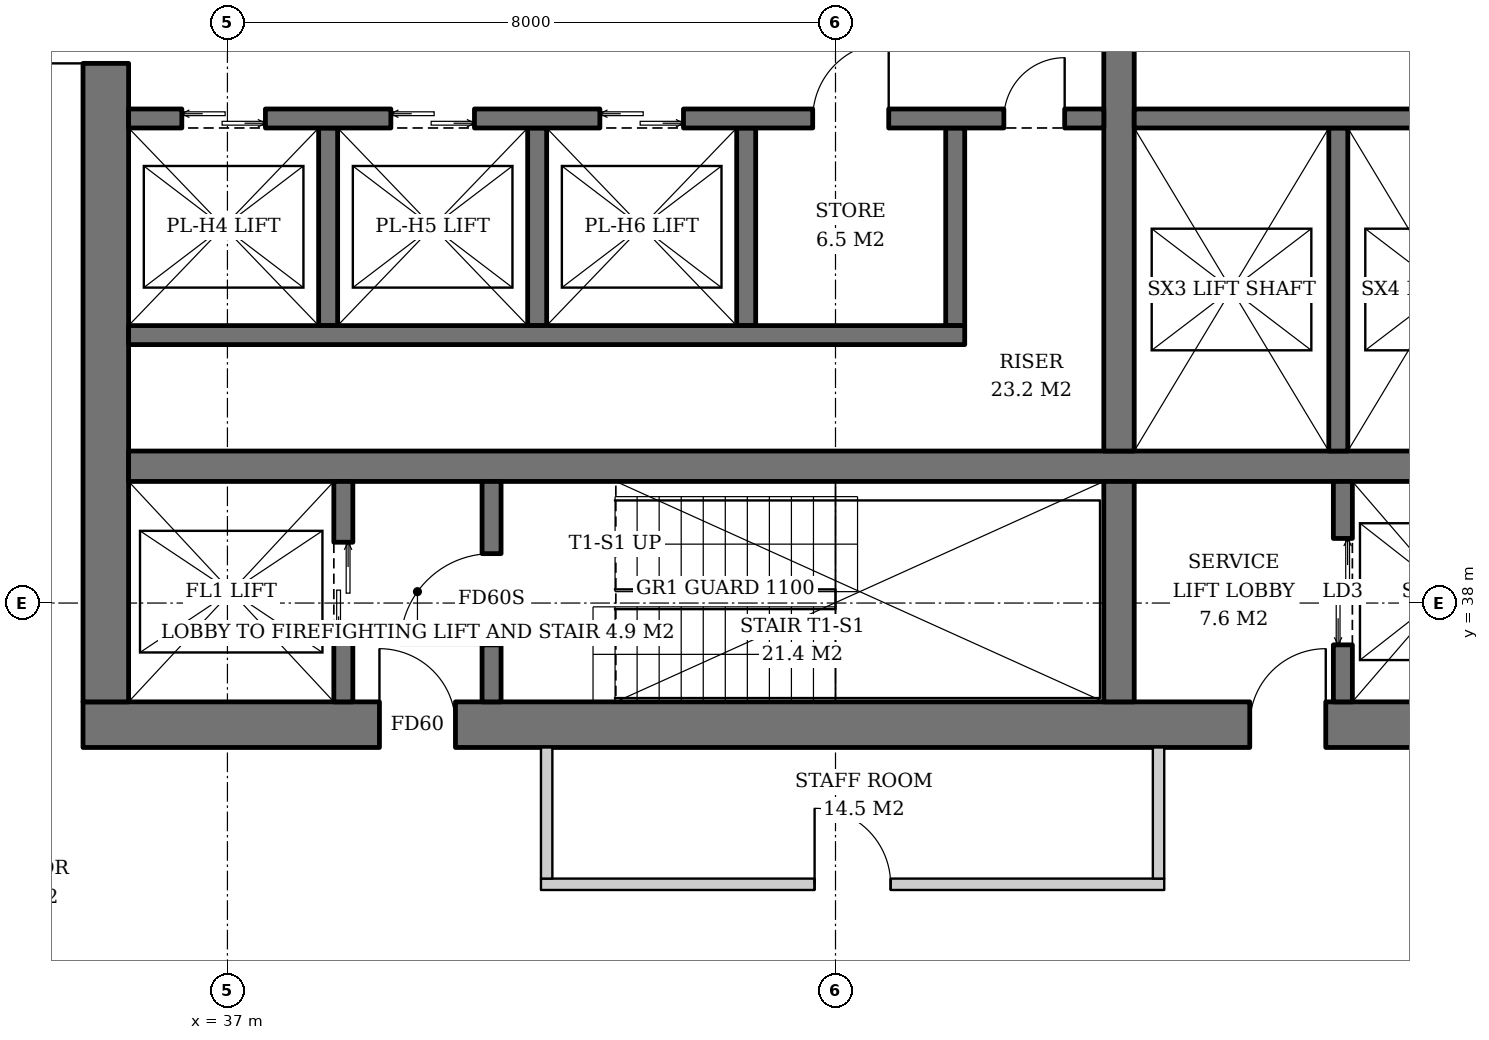
"""IFC4 building model, lengths in metres.
Left out: names, types, materials, properties, quantities, classifications, styles, units other than length and angle.
Written with IfcOpenShell. Run it as: python <this file> out.ifc"""

import sys

from ifc_helpers import new_model, si_unit, direction, frame, frame_2d, origin, place, context, subcontext, project, spatial, rectangle, extrude, element, fill, save


model = new_model("IFC4")
c1 = context("Model", 3, precision=1e-05, world=origin(), true_north=direction((0.0, 1.0)))
c2 = subcontext(c1, "Body", "Model", "MODEL_VIEW")
j1 = project(units=[si_unit("LENGTHUNIT", "METRE"), si_unit("PLANEANGLEUNIT", "RADIAN")], contexts=[c1])
p1 = place(None, origin())
s1 = spatial("IfcSite", under=j1, at=p1, CompositionType="ELEMENT")
p2 = place(p1, origin())
s2 = spatial("IfcBuilding", under=s1, at=p2, CompositionType="ELEMENT")
p3 = place(p2, frame((0.0, 0.0, 218.6)))
s3 = spatial("IfcBuildingStorey", under=s2, at=p3, CompositionType="ELEMENT", Elevation=218.6)
p4 = place(p3, frame((35.1, 36.4, 0.0), z_axis=(0.0, 0.0, 1.0), x_axis=(1.0, 0.0, 0.0)))
e1 = element("IfcWall", 1, at=p4, inside=s3, PredefinedType="SHEAR", context=c2, shape_type="SweptSolid", body=[
    extrude(rectangle(XDim=19.8, YDim=0.6, at=frame_2d((9.9, 0.0))), origin(), (0.0, 0.0, 1.0), 3.8),
])
p5 = place(p4, frame((3.9, 0.0, 0.0)))
e2 = element("IfcOpeningElement", 2, at=p5, cuts=e1, PredefinedType="OPENING", context=c2, shape_type="SweptSolid", body=[
    extrude(rectangle(XDim=1.0, YDim=2.1, at=frame_2d((0.5, 1.05))), frame((0.0, 0.31, 0.0), z_axis=(0.0, -1.0, 0.0), x_axis=(1.0, 0.0, 0.0)), (0.0, 0.0, 1.0), 0.62),
])
p6 = place(p4, frame((15.35, 0.0, 0.0)))
e3 = element("IfcOpeningElement", 3, at=p6, cuts=e1, PredefinedType="OPENING", context=c2, shape_type="SweptSolid", body=[
    extrude(rectangle(XDim=1.0, YDim=2.1, at=frame_2d((0.5, 1.05))), frame((0.0, 0.31, 0.0), z_axis=(0.0, -1.0, 0.0), x_axis=(1.0, 0.0, 0.0)), (0.0, 0.0, 1.0), 0.62),
])
p7 = place(p3, frame((35.4, 36.7, 0.0), z_axis=(0.0, 0.0, 1.0), x_axis=(0.0, 1.0, 0.0)))
e4 = element("IfcWall", 4, at=p7, inside=s3, PredefinedType="SHEAR", context=c2, shape_type="SweptSolid", body=[
    extrude(rectangle(XDim=18.6, YDim=0.6, at=frame_2d((9.3, 0.0))), origin(), (0.0, 0.0, 1.0), 3.8),
])
p8 = place(p7, frame((8.4, 0.0, 0.0)))
e5 = element("IfcOpeningElement", 5, at=p8, cuts=e4, PredefinedType="OPENING", context=c2, shape_type="SweptSolid", body=[
    extrude(rectangle(XDim=1.8, YDim=2.4, at=frame_2d((0.9, 1.2))), frame((0.0, 0.31, 0.0), z_axis=(0.0, -1.0, 0.0), x_axis=(1.0, 0.0, 0.0)), (0.0, 0.0, 1.0), 0.62),
])
p9 = place(p3, frame((35.7, 39.8, 0.0), z_axis=(0.0, 0.0, 1.0), x_axis=(1.0, 0.0, 0.0)))
e6 = element("IfcWall", 6, at=p9, inside=s3, PredefinedType="SHEAR", context=c2, shape_type="SweptSolid", body=[
    extrude(rectangle(XDim=18.6, YDim=0.4, at=frame_2d((9.3, 0.0))), origin(), (0.0, 0.0, 1.0), 3.8),
])
p10 = place(p3, frame((48.73, 36.7, 0.0), z_axis=(0.0, 0.0, 1.0), x_axis=(0.0, 1.0, 0.0)))
e7 = element("IfcWall", 7, at=p10, inside=s3, PredefinedType="SHEAR", context=c2, shape_type="SweptSolid", body=[
    extrude(rectangle(XDim=2.9, YDim=0.4, at=frame_2d((1.45, 0.0))), origin(), (0.0, 0.0, 1.0), 3.8),
])
p11 = place(p3, frame((48.73, 40.0, 0.0), z_axis=(0.0, 0.0, 1.0), x_axis=(0.0, 1.0, 0.0)))
e8 = element("IfcWall", 8, at=p11, inside=s3, PredefinedType="SHEAR", context=c2, shape_type="SweptSolid", body=[
    extrude(rectangle(XDim=12.0, YDim=0.4, at=frame_2d((6.0, 0.0))), origin(), (0.0, 0.0, 1.0), 3.8),
])
p12 = place(p3, frame((38.525, 36.7, 0.0), z_axis=(0.0, 0.0, 1.0), x_axis=(0.0, 1.0, 0.0)))
e9 = element("IfcWall", 9, at=p12, inside=s3, PredefinedType="SHEAR", context=c2, shape_type="SweptSolid", body=[
    extrude(rectangle(XDim=2.9, YDim=0.25, at=frame_2d((1.45, 0.0))), origin(), (0.0, 0.0, 1.0), 3.8),
])
p13 = place(p12, frame((0.8, 0.0, 0.0)))
e10 = element("IfcOpeningElement", 10, at=p13, cuts=e9, PredefinedType="OPENING", context=c2, shape_type="SweptSolid", body=[
    extrude(rectangle(XDim=1.3, YDim=2.2, at=frame_2d((0.65, 1.1))), frame((0.0, 0.135, 0.0), z_axis=(0.0, -1.0, 0.0), x_axis=(1.0, 0.0, 0.0)), (0.0, 0.0, 1.0), 0.27),
])
p14 = place(p3, frame((40.475, 36.7, 0.0), z_axis=(0.0, 0.0, 1.0), x_axis=(0.0, 1.0, 0.0)))
e11 = element("IfcWall", 11, at=p14, inside=s3, PredefinedType="SHEAR", context=c2, shape_type="SweptSolid", body=[
    extrude(rectangle(XDim=2.9, YDim=0.25, at=frame_2d((1.45, 0.0))), origin(), (0.0, 0.0, 1.0), 3.8),
])
p15 = place(p14, frame((0.75, 0.0, 0.0)))
e12 = element("IfcOpeningElement", 12, at=p15, cuts=e11, PredefinedType="OPENING", context=c2, shape_type="SweptSolid", body=[
    extrude(rectangle(XDim=1.2, YDim=2.1, at=frame_2d((0.6, 1.05))), frame((0.0, 0.135, 0.0), z_axis=(0.0, -1.0, 0.0), x_axis=(1.0, 0.0, 0.0)), (0.0, 0.0, 1.0), 0.27),
])
p16 = place(p3, frame((51.675, 36.7, 0.0), z_axis=(0.0, 0.0, 1.0), x_axis=(0.0, 1.0, 0.0)))
e13 = element("IfcWall", 13, at=p16, inside=s3, PredefinedType="SHEAR", context=c2, shape_type="SweptSolid", body=[
    extrude(rectangle(XDim=2.9, YDim=0.25, at=frame_2d((1.45, 0.0))), origin(), (0.0, 0.0, 1.0), 3.8),
])
p17 = place(p16, frame((0.75, 0.0, 0.0)))
e14 = element("IfcOpeningElement", 14, at=p17, cuts=e13, PredefinedType="OPENING", context=c2, shape_type="SweptSolid", body=[
    extrude(rectangle(XDim=1.4, YDim=2.4, at=frame_2d((0.7, 1.2))), frame((0.0, 0.135, 0.0), z_axis=(0.0, -1.0, 0.0), x_axis=(1.0, 0.0, 0.0)), (0.0, 0.0, 1.0), 0.27),
])
for number, where, z_axis, x_axis in (
    (15, (38.325, 44.25, 0.0), (0.0, 0.0, 1.0), (0.0, -1.0, 0.0)),
    (16, (41.075, 44.25, 0.0), (0.0, 0.0, 1.0), (0.0, -1.0, 0.0)),
    (17, (43.825, 44.25, 0.0), (0.0, 0.0, 1.0), (0.0, -1.0, 0.0)),
    (18, (46.575, 44.25, 0.0), (0.0, 0.0, 1.0), (0.0, -1.0, 0.0)),
):
    element("IfcWall", number, at=place(p3, frame(where, z_axis=z_axis, x_axis=x_axis)), inside=s3, PredefinedType="SHEAR", context=c2, shape_type="SweptSolid", body=[
        extrude(rectangle(XDim=2.6, YDim=0.25, at=frame_2d((1.3, 0.0))), origin(), (0.0, 0.0, 1.0), 3.8),
    ])
p18 = place(p3, frame((35.7, 41.525, 0.0), z_axis=(0.0, 0.0, 1.0), x_axis=(1.0, 0.0, 0.0)))
e19 = element("IfcWall", 19, at=p18, inside=s3, PredefinedType="SHEAR", context=c2, shape_type="SweptSolid", body=[
    extrude(rectangle(XDim=11.0, YDim=0.25, at=frame_2d((5.5, 0.0))), origin(), (0.0, 0.0, 1.0), 3.8),
])
p19 = place(p3, frame((35.7, 44.375, 0.0), z_axis=(0.0, 0.0, 1.0), x_axis=(1.0, 0.0, 0.0)))
e20 = element("IfcWall", 20, at=p19, inside=s3, PredefinedType="SHEAR", context=c2, shape_type="SweptSolid", body=[
    extrude(rectangle(XDim=12.83, YDim=0.25, at=frame_2d((6.415, 0.0))), origin(), (0.0, 0.0, 1.0), 3.8),
])
p20 = place(p19, frame((0.7, 0.0, 0.0)))
e21 = element("IfcOpeningElement", 21, at=p20, cuts=e20, PredefinedType="OPENING", context=c2, shape_type="SweptSolid", body=[
    extrude(rectangle(XDim=1.1, YDim=2.2, at=frame_2d((0.55, 1.1))), frame((0.0, 0.135, 0.0), z_axis=(0.0, -1.0, 0.0), x_axis=(1.0, 0.0, 0.0)), (0.0, 0.0, 1.0), 0.27),
])
p21 = place(p19, frame((3.45, 0.0, 0.0)))
e22 = element("IfcOpeningElement", 22, at=p21, cuts=e20, PredefinedType="OPENING", context=c2, shape_type="SweptSolid", body=[
    extrude(rectangle(XDim=1.1, YDim=2.2, at=frame_2d((0.55, 1.1))), frame((0.0, 0.135, 0.0), z_axis=(0.0, -1.0, 0.0), x_axis=(1.0, 0.0, 0.0)), (0.0, 0.0, 1.0), 0.27),
])
p22 = place(p19, frame((6.2, 0.0, 0.0)))
e23 = element("IfcOpeningElement", 23, at=p22, cuts=e20, PredefinedType="OPENING", context=c2, shape_type="SweptSolid", body=[
    extrude(rectangle(XDim=1.1, YDim=2.2, at=frame_2d((0.55, 1.1))), frame((0.0, 0.135, 0.0), z_axis=(0.0, -1.0, 0.0), x_axis=(1.0, 0.0, 0.0)), (0.0, 0.0, 1.0), 0.27),
])
p23 = place(p19, frame((9.0, 0.0, 0.0)))
e24 = element("IfcOpeningElement", 24, at=p23, cuts=e20, PredefinedType="OPENING", context=c2, shape_type="SweptSolid", body=[
    extrude(rectangle(XDim=1.0, YDim=2.1, at=frame_2d((0.5, 1.05))), frame((0.0, 0.135, 0.0), z_axis=(0.0, -1.0, 0.0), x_axis=(1.0, 0.0, 0.0)), (0.0, 0.0, 1.0), 0.27),
])
p24 = place(p19, frame((11.515, 0.0, 0.0)))
e25 = element("IfcOpeningElement", 25, at=p24, cuts=e20, PredefinedType="OPENING", context=c2, shape_type="SweptSolid", body=[
    extrude(rectangle(XDim=0.8, YDim=2.0, at=frame_2d((0.4, 1.0))), frame((0.0, 0.135, 0.0), z_axis=(0.0, -1.0, 0.0), x_axis=(1.0, 0.0, 0.0)), (0.0, 0.0, 1.0), 0.27),
])
p25 = place(p3, frame((51.615, 44.25, 0.0), z_axis=(0.0, 0.0, 1.0), x_axis=(0.0, -1.0, 0.0)))
e26 = element("IfcWall", 26, at=p25, inside=s3, PredefinedType="SHEAR", context=c2, shape_type="SweptSolid", body=[
    extrude(rectangle(XDim=4.25, YDim=0.25, at=frame_2d((2.125, 0.0))), origin(), (0.0, 0.0, 1.0), 3.8),
])
p26 = place(p3, frame((48.93, 44.375, 0.0), z_axis=(0.0, 0.0, 1.0), x_axis=(1.0, 0.0, 0.0)))
e27 = element("IfcWall", 27, at=p26, inside=s3, PredefinedType="SHEAR", context=c2, shape_type="SweptSolid", body=[
    extrude(rectangle(XDim=5.37, YDim=0.25, at=frame_2d((2.685, 0.0))), origin(), (0.0, 0.0, 1.0), 3.8),
])
p27 = place(p3, frame((41.125, 34.3, 0.0), z_axis=(0.0, 0.0, 1.0), x_axis=(1.0, 0.0, 0.0)))
e28 = element("IfcWall", 28, at=p27, inside=s3, PredefinedType="PARTITIONING", context=c2, shape_type="SweptSolid", body=[
    extrude(rectangle(XDim=8.2, YDim=0.15, at=frame_2d((4.1, 0.0))), origin(), (0.0, 0.0, 1.0), 2.867),
])
p28 = place(p27, frame((3.6, 0.0, 0.0)))
e29 = element("IfcOpeningElement", 29, at=p28, cuts=e28, PredefinedType="OPENING", context=c2, shape_type="SweptSolid", body=[
    extrude(rectangle(XDim=1.0, YDim=2.1, at=frame_2d((0.5, 1.05))), frame((0.0, 0.085, 0.0), z_axis=(0.0, -1.0, 0.0), x_axis=(1.0, 0.0, 0.0)), (0.0, 0.0, 1.0), 0.17),
])
for number, where, z_axis, x_axis in (
    (30, (41.2, 36.1, 0.0), (0.0, 0.0, 1.0), (0.0, -1.0, 0.0)),
    (31, (49.25, 36.1, 0.0), (0.0, 0.0, 1.0), (0.0, -1.0, 0.0)),
):
    element("IfcWall", number, at=place(p3, frame(where, z_axis=z_axis, x_axis=x_axis)), inside=s3, PredefinedType="PARTITIONING", context=c2, shape_type="SweptSolid", body=[
        extrude(rectangle(XDim=1.725, YDim=0.15, at=frame_2d((0.863, 0.0))), origin(), (0.0, 0.0, 1.0), 3.62),
    ])
p29 = place(p13, origin())
e32 = element("IfcDoor", 32, at=p29, inside=s3, OperationType="DOUBLE_DOOR_SLIDING", PredefinedType="DOOR", context=c2, shape_type="SweptSolid", body=[
    extrude(rectangle(XDim=1.3, YDim=2.2, at=frame_2d((0.65, 1.1))), frame((0.0, 0.025, 0.0), z_axis=(0.0, -1.0, 0.0), x_axis=(1.0, 0.0, 0.0)), (0.0, 0.0, 1.0), 0.05),
])
fill(e10, e32)
p30 = place(p15, origin())
e33 = element("IfcDoor", 33, at=p30, inside=s3, OperationType="SINGLE_SWING_LEFT", PredefinedType="DOOR", context=c2, shape_type="SweptSolid", body=[
    extrude(rectangle(XDim=1.2, YDim=2.1, at=frame_2d((0.6, 1.05))), frame((0.0, 0.025, 0.0), z_axis=(0.0, -1.0, 0.0), x_axis=(1.0, 0.0, 0.0)), (0.0, 0.0, 1.0), 0.05),
])
fill(e12, e33)
p31 = place(p17, origin())
e34 = element("IfcDoor", 34, at=p31, inside=s3, OperationType="DOUBLE_DOOR_SLIDING", PredefinedType="DOOR", context=c2, shape_type="SweptSolid", body=[
    extrude(rectangle(XDim=1.4, YDim=2.4, at=frame_2d((0.7, 1.2))), frame((0.0, 0.025, 0.0), z_axis=(0.0, -1.0, 0.0), x_axis=(1.0, 0.0, 0.0)), (0.0, 0.0, 1.0), 0.05),
])
fill(e14, e34)
p32 = place(p20, origin())
e35 = element("IfcDoor", 35, at=p32, inside=s3, OperationType="DOUBLE_DOOR_SLIDING", PredefinedType="DOOR", context=c2, shape_type="SweptSolid", body=[
    extrude(rectangle(XDim=1.1, YDim=2.2, at=frame_2d((0.55, 1.1))), frame((0.0, 0.025, 0.0), z_axis=(0.0, -1.0, 0.0), x_axis=(1.0, 0.0, 0.0)), (0.0, 0.0, 1.0), 0.05),
])
fill(e21, e35)
p33 = place(p21, origin())
e36 = element("IfcDoor", 36, at=p33, inside=s3, OperationType="DOUBLE_DOOR_SLIDING", PredefinedType="DOOR", context=c2, shape_type="SweptSolid", body=[
    extrude(rectangle(XDim=1.1, YDim=2.2, at=frame_2d((0.55, 1.1))), frame((0.0, 0.025, 0.0), z_axis=(0.0, -1.0, 0.0), x_axis=(1.0, 0.0, 0.0)), (0.0, 0.0, 1.0), 0.05),
])
fill(e22, e36)
p34 = place(p22, origin())
e37 = element("IfcDoor", 37, at=p34, inside=s3, OperationType="DOUBLE_DOOR_SLIDING", PredefinedType="DOOR", context=c2, shape_type="SweptSolid", body=[
    extrude(rectangle(XDim=1.1, YDim=2.2, at=frame_2d((0.55, 1.1))), frame((0.0, 0.025, 0.0), z_axis=(0.0, -1.0, 0.0), x_axis=(1.0, 0.0, 0.0)), (0.0, 0.0, 1.0), 0.05),
])
fill(e23, e37)
p35 = place(p23, origin())
e38 = element("IfcDoor", 38, at=p35, inside=s3, OperationType="SINGLE_SWING_RIGHT", PredefinedType="DOOR", context=c2, shape_type="SweptSolid", body=[
    extrude(rectangle(XDim=1.0, YDim=2.1, at=frame_2d((0.5, 1.05))), frame((0.0, 0.025, 0.0), z_axis=(0.0, -1.0, 0.0), x_axis=(1.0, 0.0, 0.0)), (0.0, 0.0, 1.0), 0.05),
])
fill(e24, e38)
p36 = place(p24, origin())
e39 = element("IfcDoor", 39, at=p36, inside=s3, OperationType="SINGLE_SWING_RIGHT", PredefinedType="DOOR", context=c2, shape_type="SweptSolid", body=[
    extrude(rectangle(XDim=0.8, YDim=2.0, at=frame_2d((0.4, 1.0))), frame((0.0, 0.025, 0.0), z_axis=(0.0, -1.0, 0.0), x_axis=(1.0, 0.0, 0.0)), (0.0, 0.0, 1.0), 0.05),
])
fill(e25, e39)
p37 = place(p5, origin())
e40 = element("IfcDoor", 40, at=p37, inside=s3, OperationType="SINGLE_SWING_LEFT", PredefinedType="DOOR", context=c2, shape_type="SweptSolid", body=[
    extrude(rectangle(XDim=1.0, YDim=2.1, at=frame_2d((0.5, 1.05))), frame((0.0, 0.025, 0.0), z_axis=(0.0, -1.0, 0.0), x_axis=(1.0, 0.0, 0.0)), (0.0, 0.0, 1.0), 0.05),
])
fill(e2, e40)
p38 = place(p8, origin())
e41 = element("IfcDoor", 41, at=p38, inside=s3, OperationType="DOUBLE_DOOR_SINGLE_SWING", PredefinedType="DOOR", context=c2, shape_type="SweptSolid", body=[
    extrude(rectangle(XDim=1.8, YDim=2.4, at=frame_2d((0.9, 1.2))), frame((0.0, 0.025, 0.0), z_axis=(0.0, -1.0, 0.0), x_axis=(1.0, 0.0, 0.0)), (0.0, 0.0, 1.0), 0.05),
])
fill(e5, e41)
p39 = place(p6, origin())
e42 = element("IfcDoor", 42, at=p39, inside=s3, OperationType="SINGLE_SWING_RIGHT", PredefinedType="DOOR", context=c2, shape_type="SweptSolid", body=[
    extrude(rectangle(XDim=1.0, YDim=2.1, at=frame_2d((0.5, 1.05))), frame((0.0, 0.025, 0.0), z_axis=(0.0, -1.0, 0.0), x_axis=(1.0, 0.0, 0.0)), (0.0, 0.0, 1.0), 0.05),
])
fill(e3, e42)
p40 = place(p28, origin())
e43 = element("IfcDoor", 43, at=p40, inside=s3, OperationType="SINGLE_SWING_LEFT", PredefinedType="DOOR", context=c2, shape_type="SweptSolid", body=[
    extrude(rectangle(XDim=1.0, YDim=2.1, at=frame_2d((0.5, 1.05))), frame((0.0, 0.025, 0.0), z_axis=(0.0, -1.0, 0.0), x_axis=(1.0, 0.0, 0.0)), (0.0, 0.0, 1.0), 0.05),
])
fill(e29, e43)
save(model, sys.argv[1])
